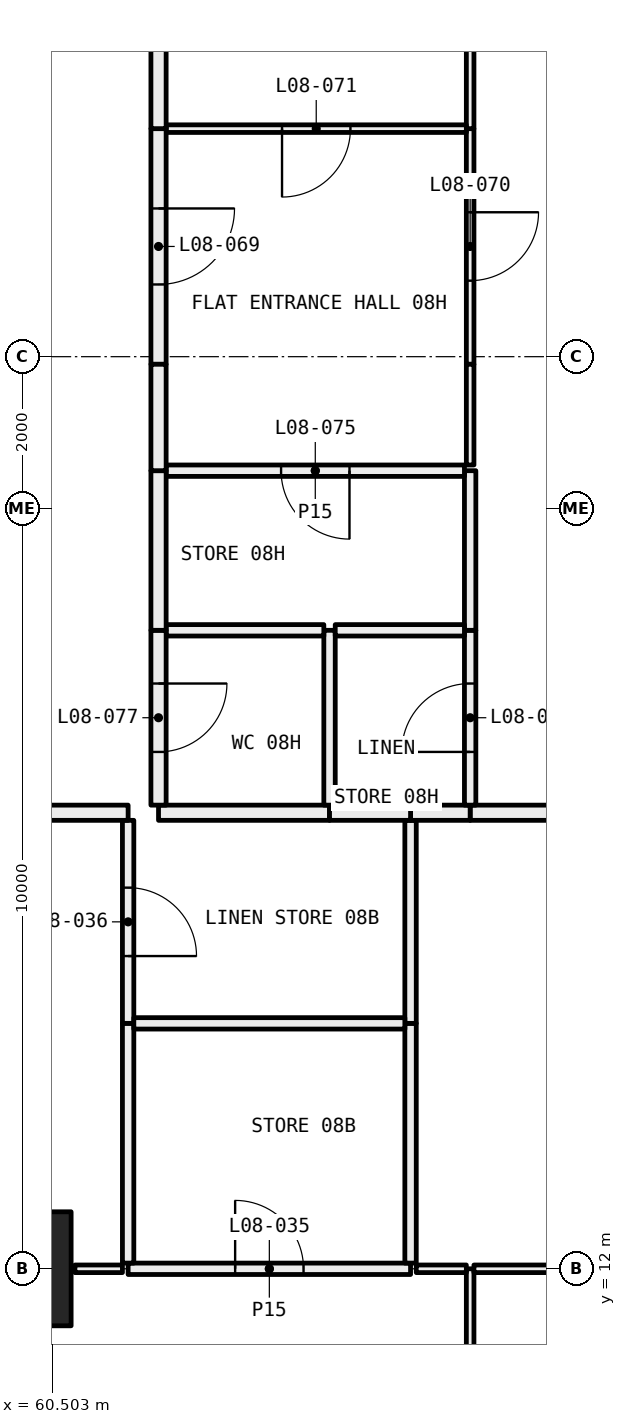
"""IFC4 building model, lengths in metres.
Left out: names, types, materials, properties, quantities, classifications, styles, units other than length and angle.
Written with IfcOpenShell. Run it as: python <this file> out.ifc"""

import sys

from ifc_helpers import new_model, si_unit, direction, frame, frame_2d, origin, origin_2d, place, context, subcontext, project, spatial, rectangle, hollow_rectangle, extrude, element, fill, save


model = new_model("IFC4")
c1 = context("Model", 3, precision=1e-05, world=origin(), true_north=direction((0.0, 1.0)))
c2 = subcontext(c1, "Body", "Model", "MODEL_VIEW")
j1 = project(units=[si_unit("LENGTHUNIT", "METRE"), si_unit("PLANEANGLEUNIT", "RADIAN")], contexts=[c1])
p1 = place(None, origin())
s1 = spatial("IfcSite", under=j1, at=p1, CompositionType="ELEMENT")
p2 = place(p1, origin())
s2 = spatial("IfcBuilding", under=s1, at=p2, CompositionType="ELEMENT")
p3 = place(p2, frame((0.0, 0.0, 40.35)))
s3 = spatial("IfcBuildingStorey", under=s2, at=p3, CompositionType="ELEMENT", Elevation=40.35)
p4 = place(p3, frame((60.0, 12.0, 0.0), z_axis=(0.0, 0.0, 1.0), x_axis=(1.0, 0.0, 0.0)))
e1 = element("IfcColumn", 1, at=p4, inside=s3, PredefinedType="COLUMN", context=c2, shape_type="SweptSolid", body=[
    extrude(hollow_rectangle(XDim=1.5, YDim=1.5, WallThickness=0.065, at=origin_2d()), origin(), (0.0, 0.0, 1.0), 3.05),
])
p5 = place(p3, frame((66.0, 6.72, 0.0), z_axis=(0.0, 0.0, 1.0), x_axis=(0.0, 1.0, 0.0)))
e2 = element("IfcWall", 2, at=p5, inside=s3, PredefinedType="PARTITIONING", context=c2, shape_type="SweptSolid", body=[
    extrude(rectangle(XDim=5.28, YDim=0.1, at=frame_2d((2.64, 0.0))), origin(), (0.0, 0.0, 1.0), 2.45),
])
p6 = place(p5, frame((2.19, 0.0, 0.0)))
e3 = element("IfcOpeningElement", 3, at=p6, cuts=e2, PredefinedType="OPENING", context=c2, shape_type="SweptSolid", body=[
    extrude(rectangle(XDim=0.9, YDim=2.1, at=frame_2d((0.45, 1.05))), frame((0.0, 0.06, 0.0), z_axis=(0.0, -1.0, 0.0), x_axis=(1.0, 0.0, 0.0)), (0.0, 0.0, 1.0), 0.12),
])
p7 = place(p3, frame((61.425, 12.0, 0.0), z_axis=(0.0, 0.0, 1.0), x_axis=(-1.0, 0.0, 0.0)))
e4 = element("IfcWall", 4, at=p7, inside=s3, PredefinedType="PARTITIONING", context=c2, shape_type="SweptSolid", body=[
    extrude(rectangle(XDim=0.625, YDim=0.1, at=frame_2d((0.312, 0.0))), origin(), (0.0, 0.0, 1.0), 2.45),
])
p8 = place(p3, frame((65.95, 12.0, 0.0), z_axis=(0.0, 0.0, 1.0), x_axis=(-1.0, 0.0, 0.0)))
e5 = element("IfcWall", 5, at=p8, inside=s3, PredefinedType="PARTITIONING", context=c2, shape_type="SweptSolid", body=[
    extrude(rectangle(XDim=0.659, YDim=0.1, at=frame_2d((0.33, 0.0))), origin(), (0.0, 0.0, 1.0), 2.45),
])
p9 = place(p3, frame((65.216, 12.0, 0.0), z_axis=(0.0, 0.0, 1.0), x_axis=(-1.0, 0.0, 0.0)))
e6 = element("IfcWall", 6, at=p9, inside=s3, PredefinedType="PARTITIONING", context=c2, shape_type="SweptSolid", body=[
    extrude(rectangle(XDim=3.716, YDim=0.15, at=frame_2d((1.858, 0.0))), origin(), (0.0, 0.0, 1.0), 2.45),
])
p10 = place(p9, frame((1.408, 0.0, 0.0)))
e7 = element("IfcOpeningElement", 7, at=p10, cuts=e6, PredefinedType="OPENING", context=c2, shape_type="SweptSolid", body=[
    extrude(rectangle(XDim=0.9, YDim=2.1, at=frame_2d((0.45, 1.05))), frame((0.0, 0.085, 0.0), z_axis=(0.0, -1.0, 0.0), x_axis=(1.0, 0.0, 0.0)), (0.0, 0.0, 1.0), 0.17),
])
p11 = place(p3, frame((71.28, 12.0, 0.0), z_axis=(0.0, 0.0, 1.0), x_axis=(-1.0, 0.0, 0.0)))
e8 = element("IfcWall", 8, at=p11, inside=s3, PredefinedType="PARTITIONING", context=c2, shape_type="SweptSolid", body=[
    extrude(rectangle(XDim=5.23, YDim=0.1, at=frame_2d((2.615, 0.0))), origin(), (0.0, 0.0, 1.0), 2.45),
])
p12 = place(p11, frame((2.165, 0.0, 0.0)))
e9 = element("IfcOpeningElement", 9, at=p12, cuts=e8, PredefinedType="OPENING", context=c2, shape_type="SweptSolid", body=[
    extrude(rectangle(XDim=0.9, YDim=2.1, at=frame_2d((0.45, 1.05))), frame((0.0, 0.06, 0.0), z_axis=(0.0, -1.0, 0.0), x_axis=(1.0, 0.0, 0.0)), (0.0, 0.0, 1.0), 0.12),
])
p13 = place(p3, frame((61.5, 12.075, 0.0), z_axis=(0.0, 0.0, 1.0), x_axis=(0.0, 1.0, 0.0)))
e10 = element("IfcWall", 10, at=p13, inside=s3, PredefinedType="PARTITIONING", context=c2, shape_type="SweptSolid", body=[
    extrude(rectangle(XDim=3.154, YDim=0.15, at=frame_2d((1.577, 0.0))), origin(), (0.0, 0.0, 1.0), 2.45),
])
p14 = place(p3, frame((61.5, 15.229, 0.0), z_axis=(0.0, 0.0, 1.0), x_axis=(0.0, 1.0, 0.0)))
e11 = element("IfcWall", 11, at=p14, inside=s3, PredefinedType="PARTITIONING", context=c2, shape_type="SweptSolid", body=[
    extrude(rectangle(XDim=2.671, YDim=0.15, at=frame_2d((1.335, 0.0))), origin(), (0.0, 0.0, 1.0), 3.05),
])
p15 = place(p14, frame((0.885, 0.0, 0.0)))
e12 = element("IfcOpeningElement", 12, at=p15, cuts=e11, PredefinedType="OPENING", context=c2, shape_type="SweptSolid", body=[
    extrude(rectangle(XDim=0.9, YDim=2.1, at=frame_2d((0.45, 1.05))), frame((0.0, 0.085, 0.0), z_axis=(0.0, -1.0, 0.0), x_axis=(1.0, 0.0, 0.0)), (0.0, 0.0, 1.0), 0.17),
])
p16 = place(p3, frame((61.5, 18.0, 0.0), z_axis=(0.0, 0.0, 1.0), x_axis=(-1.0, 0.0, 0.0)))
e13 = element("IfcWall", 13, at=p16, inside=s3, PredefinedType="PARTITIONING", context=c2, shape_type="SweptSolid", body=[
    extrude(rectangle(XDim=9.0, YDim=0.2, at=frame_2d((4.5, 0.0))), origin(), (0.0, 0.0, 1.0), 3.05),
])
p17 = place(p3, frame((65.216, 15.229, 0.0), z_axis=(0.0, 0.0, 1.0), x_axis=(0.0, -1.0, 0.0)))
e14 = element("IfcWall", 14, at=p17, inside=s3, PredefinedType="PARTITIONING", context=c2, shape_type="SweptSolid", body=[
    extrude(rectangle(XDim=3.154, YDim=0.15, at=frame_2d((1.577, 0.0))), origin(), (0.0, 0.0, 1.0), 2.45),
])
p18 = place(p3, frame((65.216, 17.9, 0.0), z_axis=(0.0, 0.0, 1.0), x_axis=(0.0, -1.0, 0.0)))
e15 = element("IfcWall", 15, at=p18, inside=s3, PredefinedType="PARTITIONING", context=c2, shape_type="SweptSolid", body=[
    extrude(rectangle(XDim=2.671, YDim=0.15, at=frame_2d((1.335, 0.0))), origin(), (0.0, 0.0, 1.0), 3.05),
])
p19 = place(p3, frame((71.28, 18.0, 0.0), z_axis=(0.0, 0.0, 1.0), x_axis=(-1.0, 0.0, 0.0)))
e16 = element("IfcWall", 16, at=p19, inside=s3, PredefinedType="PARTITIONING", context=c2, shape_type="SweptSolid", body=[
    extrude(rectangle(XDim=5.28, YDim=0.2, at=frame_2d((2.64, 0.0))), origin(), (0.0, 0.0, 1.0), 3.05),
])
p20 = place(p3, frame((66.0, 18.0, 0.0), z_axis=(0.0, 0.0, 1.0), x_axis=(-1.0, 0.0, 0.0)))
e17 = element("IfcWall", 17, at=p20, inside=s3, PredefinedType="PARTITIONING", context=c2, shape_type="SweptSolid", body=[
    extrude(rectangle(XDim=0.784, YDim=0.2, at=frame_2d((0.392, 0.0))), origin(), (0.0, 0.0, 1.0), 3.05),
])
p21 = place(p3, frame((65.141, 15.229, 0.0), z_axis=(0.0, 0.0, 1.0), x_axis=(-1.0, 0.0, 0.0)))
e18 = element("IfcWall", 18, at=p21, inside=s3, PredefinedType="PARTITIONING", context=c2, shape_type="SweptSolid", body=[
    extrude(rectangle(XDim=3.566, YDim=0.15, at=frame_2d((1.783, 0.0))), origin(), (0.0, 0.0, 1.0), 3.05),
])
p22 = place(p3, frame((64.15, 18.0, 0.0), z_axis=(0.0, 0.0, 1.0), x_axis=(-1.0, 0.0, 0.0)))
e19 = element("IfcWall", 19, at=p22, inside=s3, PredefinedType="PARTITIONING", context=c2, shape_type="SweptSolid", body=[
    extrude(rectangle(XDim=2.25, YDim=0.2, at=frame_2d((1.125, 0.0))), origin(), (0.0, 0.0, 1.0), 3.05),
])
p23 = place(p3, frame((65.216, 18.0, 0.0), z_axis=(0.0, 0.0, 1.0), x_axis=(-1.0, 0.0, 0.0)))
e20 = element("IfcWall", 20, at=p23, inside=s3, PredefinedType="PARTITIONING", context=c2, shape_type="SweptSolid", body=[
    extrude(rectangle(XDim=1.066, YDim=0.2, at=frame_2d((0.533, 0.0))), origin(), (0.0, 0.0, 1.0), 3.05),
])
p24 = place(p3, frame((66.0, 20.4, 0.0), z_axis=(0.0, 0.0, 1.0), x_axis=(0.0, -1.0, 0.0)))
e21 = element("IfcWall", 21, at=p24, inside=s3, PredefinedType="PARTITIONING", context=c2, shape_type="SweptSolid", body=[
    extrude(rectangle(XDim=2.3, YDim=0.15, at=frame_2d((1.15, 0.0))), origin(), (0.0, 0.0, 1.0), 3.05),
])
p25 = place(p24, frame((0.7, 0.0, 0.0)))
e22 = element("IfcOpeningElement", 22, at=p25, cuts=e21, PredefinedType="OPENING", context=c2, shape_type="SweptSolid", body=[
    extrude(rectangle(XDim=0.9, YDim=2.1, at=frame_2d((0.45, 1.05))), frame((0.0, 0.085, 0.0), z_axis=(0.0, -1.0, 0.0), x_axis=(1.0, 0.0, 0.0)), (0.0, 0.0, 1.0), 0.17),
])
p26 = place(p3, frame((66.0, 22.5, 0.0), z_axis=(0.0, 0.0, 1.0), x_axis=(0.0, -1.0, 0.0)))
e23 = element("IfcWall", 23, at=p26, inside=s3, PredefinedType="PARTITIONING", context=c2, shape_type="SweptSolid", body=[
    extrude(rectangle(XDim=2.1, YDim=0.15, at=frame_2d((1.05, 0.0))), origin(), (0.0, 0.0, 1.0), 3.05),
])
p27 = place(p3, frame((66.0, 27.0, 0.0), z_axis=(0.0, 0.0, 1.0), x_axis=(0.0, -1.0, 0.0)))
e24 = element("IfcWall", 24, at=p27, inside=s3, PredefinedType="PARTITIONING", context=c2, shape_type="SweptSolid", body=[
    extrude(rectangle(XDim=3.1, YDim=0.1, at=frame_2d((1.55, 0.0))), origin(), (0.0, 0.0, 1.0), 2.45),
])
p28 = place(p27, frame((1.1, 0.0, 0.0)))
e25 = element("IfcOpeningElement", 25, at=p28, cuts=e24, PredefinedType="OPENING", context=c2, shape_type="SweptSolid", body=[
    extrude(rectangle(XDim=0.9, YDim=2.1, at=frame_2d((0.45, 1.05))), frame((0.0, 0.06, 0.0), z_axis=(0.0, -1.0, 0.0), x_axis=(1.0, 0.0, 0.0)), (0.0, 0.0, 1.0), 0.12),
])
p29 = place(p3, frame((66.0, 23.9, 0.0), z_axis=(0.0, 0.0, 1.0), x_axis=(0.0, -1.0, 0.0)))
e26 = element("IfcWall", 26, at=p29, inside=s3, PredefinedType="PARTITIONING", context=c2, shape_type="SweptSolid", body=[
    extrude(rectangle(XDim=1.325, YDim=0.1, at=frame_2d((0.663, 0.0))), origin(), (0.0, 0.0, 1.0), 3.05),
])
p30 = place(p3, frame((66.0, 29.95, 0.0), z_axis=(0.0, 0.0, 1.0), x_axis=(0.0, -1.0, 0.0)))
e27 = element("IfcWall", 27, at=p30, inside=s3, PredefinedType="PARTITIONING", context=c2, shape_type="SweptSolid", body=[
    extrude(rectangle(XDim=2.95, YDim=0.1, at=frame_2d((1.475, 0.0))), origin(), (0.0, 0.0, 1.0), 3.05),
])
p31 = place(p3, frame((64.15, 18.1, 0.0), z_axis=(0.0, 0.0, 1.0), x_axis=(0.0, 1.0, 0.0)))
e28 = element("IfcWall", 28, at=p31, inside=s3, PredefinedType="PARTITIONING", context=c2, shape_type="SweptSolid", body=[
    extrude(rectangle(XDim=2.3, YDim=0.15, at=frame_2d((1.15, 0.0))), origin(), (0.0, 0.0, 1.0), 3.05),
])
p32 = place(p3, frame((64.075, 20.4, 0.0), z_axis=(0.0, 0.0, 1.0), x_axis=(-1.0, 0.0, 0.0)))
e29 = element("IfcWall", 29, at=p32, inside=s3, PredefinedType="PARTITIONING", context=c2, shape_type="SweptSolid", body=[
    extrude(rectangle(XDim=2.075, YDim=0.15, at=frame_2d((1.038, 0.0))), origin(), (0.0, 0.0, 1.0), 3.05),
])
p33 = place(p3, frame((61.9, 20.4, 0.0), z_axis=(0.0, 0.0, 1.0), x_axis=(0.0, -1.0, 0.0)))
e30 = element("IfcWall", 30, at=p33, inside=s3, PredefinedType="PARTITIONING", context=c2, shape_type="SweptSolid", body=[
    extrude(rectangle(XDim=2.3, YDim=0.2, at=frame_2d((1.15, 0.0))), origin(), (0.0, 0.0, 1.0), 3.05),
])
p34 = place(p33, frame((0.7, 0.0, 0.0)))
e31 = element("IfcOpeningElement", 31, at=p34, cuts=e30, PredefinedType="OPENING", context=c2, shape_type="SweptSolid", body=[
    extrude(rectangle(XDim=0.9, YDim=2.1, at=frame_2d((0.45, 1.05))), frame((0.0, 0.11, 0.0), z_axis=(0.0, -1.0, 0.0), x_axis=(1.0, 0.0, 0.0)), (0.0, 0.0, 1.0), 0.22),
])
p35 = place(p3, frame((65.925, 20.4, 0.0), z_axis=(0.0, 0.0, 1.0), x_axis=(-1.0, 0.0, 0.0)))
e32 = element("IfcWall", 32, at=p35, inside=s3, PredefinedType="PARTITIONING", context=c2, shape_type="SweptSolid", body=[
    extrude(rectangle(XDim=1.7, YDim=0.15, at=frame_2d((0.85, 0.0))), origin(), (0.0, 0.0, 1.0), 3.05),
])
p36 = place(p3, frame((65.925, 22.5, 0.0), z_axis=(0.0, 0.0, 1.0), x_axis=(-1.0, 0.0, 0.0)))
e33 = element("IfcWall", 33, at=p36, inside=s3, PredefinedType="PARTITIONING", context=c2, shape_type="SweptSolid", body=[
    extrude(rectangle(XDim=3.925, YDim=0.15, at=frame_2d((1.962, 0.0))), origin(), (0.0, 0.0, 1.0), 3.05),
])
p37 = place(p36, frame((1.512, 0.0, 0.0)))
e34 = element("IfcOpeningElement", 34, at=p37, cuts=e33, PredefinedType="OPENING", context=c2, shape_type="SweptSolid", body=[
    extrude(rectangle(XDim=0.9, YDim=2.1, at=frame_2d((0.45, 1.05))), frame((0.0, 0.085, 0.0), z_axis=(0.0, -1.0, 0.0), x_axis=(1.0, 0.0, 0.0)), (0.0, 0.0, 1.0), 0.17),
])
p38 = place(p3, frame((61.9, 22.5, 0.0), z_axis=(0.0, 0.0, 1.0), x_axis=(0.0, -1.0, 0.0)))
e35 = element("IfcWall", 35, at=p38, inside=s3, PredefinedType="PARTITIONING", context=c2, shape_type="SweptSolid", body=[
    extrude(rectangle(XDim=2.1, YDim=0.2, at=frame_2d((1.05, 0.0))), origin(), (0.0, 0.0, 1.0), 3.05),
])
p39 = place(p3, frame((65.95, 27.0, 0.0), z_axis=(0.0, 0.0, 1.0), x_axis=(-1.0, 0.0, 0.0)))
e36 = element("IfcWall", 36, at=p39, inside=s3, PredefinedType="PARTITIONING", context=c2, shape_type="SweptSolid", body=[
    extrude(rectangle(XDim=3.95, YDim=0.1, at=frame_2d((1.975, 0.0))), origin(), (0.0, 0.0, 1.0), 3.05),
])
p40 = place(p39, frame((1.525, 0.0, 0.0)))
e37 = element("IfcOpeningElement", 37, at=p40, cuts=e36, PredefinedType="OPENING", context=c2, shape_type="SweptSolid", body=[
    extrude(rectangle(XDim=0.9, YDim=2.1, at=frame_2d((0.45, 1.05))), frame((0.0, 0.06, 0.0), z_axis=(0.0, -1.0, 0.0), x_axis=(1.0, 0.0, 0.0)), (0.0, 0.0, 1.0), 0.12),
])
p41 = place(p3, frame((61.9, 27.0, 0.0), z_axis=(0.0, 0.0, 1.0), x_axis=(0.0, -1.0, 0.0)))
e38 = element("IfcWall", 38, at=p41, inside=s3, PredefinedType="PARTITIONING", context=c2, shape_type="SweptSolid", body=[
    extrude(rectangle(XDim=3.1, YDim=0.2, at=frame_2d((1.55, 0.0))), origin(), (0.0, 0.0, 1.0), 2.45),
])
p42 = place(p41, frame((1.05, 0.0, 0.0)))
e39 = element("IfcOpeningElement", 39, at=p42, cuts=e38, PredefinedType="OPENING", context=c2, shape_type="SweptSolid", body=[
    extrude(rectangle(XDim=1.0, YDim=2.1, at=frame_2d((0.5, 1.05))), frame((0.0, 0.11, 0.0), z_axis=(0.0, -1.0, 0.0), x_axis=(1.0, 0.0, 0.0)), (0.0, 0.0, 1.0), 0.22),
])
p43 = place(p3, frame((61.9, 23.9, 0.0), z_axis=(0.0, 0.0, 1.0), x_axis=(0.0, -1.0, 0.0)))
e40 = element("IfcWall", 40, at=p43, inside=s3, PredefinedType="PARTITIONING", context=c2, shape_type="SweptSolid", body=[
    extrude(rectangle(XDim=1.4, YDim=0.2, at=frame_2d((0.7, 0.0))), origin(), (0.0, 0.0, 1.0), 3.05),
])
p44 = place(p3, frame((61.9, 35.9, 0.0), z_axis=(0.0, 0.0, 1.0), x_axis=(0.0, -1.0, 0.0)))
e41 = element("IfcWall", 41, at=p44, inside=s3, PredefinedType="PARTITIONING", context=c2, shape_type="SweptSolid", body=[
    extrude(rectangle(XDim=8.9, YDim=0.2, at=frame_2d((4.45, 0.0))), origin(), (0.0, 0.0, 1.0), 3.05),
])
p45 = place(p10, frame((0.9, 0.0, 0.0), x_axis=(-1.0, 0.0, 0.0)))
e42 = element("IfcDoor", 42, at=p45, inside=s3, OperationType="SINGLE_SWING_RIGHT", PredefinedType="DOOR", context=c2, shape_type="SweptSolid", body=[
    extrude(rectangle(XDim=0.9, YDim=2.1, at=frame_2d((0.45, 1.05))), frame((0.0, 0.025, 0.0), z_axis=(0.0, -1.0, 0.0), x_axis=(1.0, 0.0, 0.0)), (0.0, 0.0, 1.0), 0.05),
])
fill(e7, e42)
p46 = place(p15, frame((0.9, 0.0, 0.0), x_axis=(-1.0, 0.0, 0.0)))
e43 = element("IfcDoor", 43, at=p46, inside=s3, OperationType="SINGLE_SWING_LEFT", PredefinedType="DOOR", context=c2, shape_type="SweptSolid", body=[
    extrude(rectangle(XDim=0.9, YDim=2.1, at=frame_2d((0.45, 1.05))), frame((0.0, 0.025, 0.0), z_axis=(0.0, -1.0, 0.0), x_axis=(1.0, 0.0, 0.0)), (0.0, 0.0, 1.0), 0.05),
])
fill(e12, e43)
p47 = place(p42, origin())
e44 = element("IfcDoor", 44, at=p47, inside=s3, OperationType="SINGLE_SWING_RIGHT", PredefinedType="DOOR", context=c2, shape_type="SweptSolid", body=[
    extrude(rectangle(XDim=1.0, YDim=2.1, at=frame_2d((0.5, 1.05))), frame((0.0, 0.025, 0.0), z_axis=(0.0, -1.0, 0.0), x_axis=(1.0, 0.0, 0.0)), (0.0, 0.0, 1.0), 0.05),
])
fill(e39, e44)
p48 = place(p28, origin())
e45 = element("IfcDoor", 45, at=p48, inside=s3, OperationType="SINGLE_SWING_RIGHT", PredefinedType="DOOR", context=c2, shape_type="SweptSolid", body=[
    extrude(rectangle(XDim=0.9, YDim=2.1, at=frame_2d((0.45, 1.05))), frame((0.0, 0.025, 0.0), z_axis=(0.0, -1.0, 0.0), x_axis=(1.0, 0.0, 0.0)), (0.0, 0.0, 1.0), 0.05),
])
fill(e25, e45)
p49 = place(p40, origin())
e46 = element("IfcDoor", 46, at=p49, inside=s3, OperationType="SINGLE_SWING_LEFT", PredefinedType="DOOR", context=c2, shape_type="SweptSolid", body=[
    extrude(rectangle(XDim=0.9, YDim=2.1, at=frame_2d((0.45, 1.05))), frame((0.0, 0.025, 0.0), z_axis=(0.0, -1.0, 0.0), x_axis=(1.0, 0.0, 0.0)), (0.0, 0.0, 1.0), 0.05),
])
fill(e37, e46)
p50 = place(p25, frame((0.9, 0.0, 0.0), x_axis=(-1.0, 0.0, 0.0)))
e47 = element("IfcDoor", 47, at=p50, inside=s3, OperationType="SINGLE_SWING_RIGHT", PredefinedType="DOOR", context=c2, shape_type="SweptSolid", body=[
    extrude(rectangle(XDim=0.9, YDim=2.1, at=frame_2d((0.45, 1.05))), frame((0.0, 0.025, 0.0), z_axis=(0.0, -1.0, 0.0), x_axis=(1.0, 0.0, 0.0)), (0.0, 0.0, 1.0), 0.05),
])
fill(e22, e47)
p51 = place(p37, origin())
e48 = element("IfcDoor", 48, at=p51, inside=s3, OperationType="SINGLE_SWING_RIGHT", PredefinedType="DOOR", context=c2, shape_type="SweptSolid", body=[
    extrude(rectangle(XDim=0.9, YDim=2.1, at=frame_2d((0.45, 1.05))), frame((0.0, 0.025, 0.0), z_axis=(0.0, -1.0, 0.0), x_axis=(1.0, 0.0, 0.0)), (0.0, 0.0, 1.0), 0.05),
])
fill(e34, e48)
p52 = place(p34, origin())
e49 = element("IfcDoor", 49, at=p52, inside=s3, OperationType="SINGLE_SWING_RIGHT", PredefinedType="DOOR", context=c2, shape_type="SweptSolid", body=[
    extrude(rectangle(XDim=0.9, YDim=2.1, at=frame_2d((0.45, 1.05))), frame((0.0, 0.025, 0.0), z_axis=(0.0, -1.0, 0.0), x_axis=(1.0, 0.0, 0.0)), (0.0, 0.0, 1.0), 0.05),
])
fill(e31, e49)
save(model, sys.argv[1])
